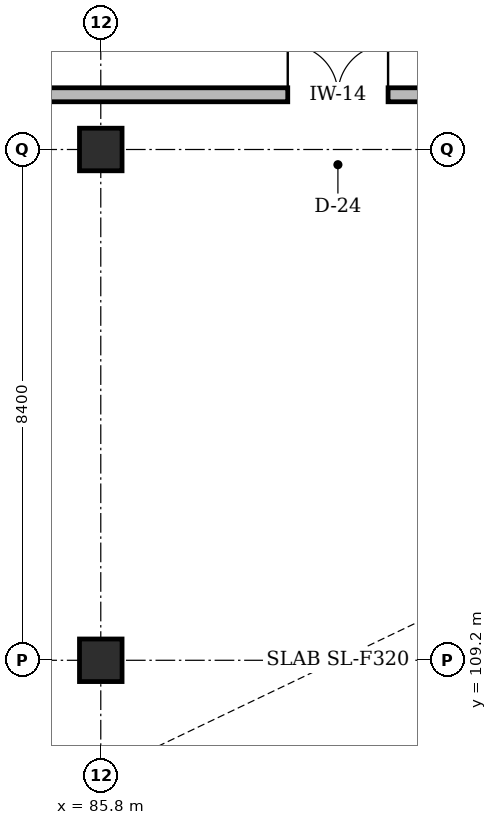
"""IFC4 building model, lengths in metres.
Left out: names, types, materials, properties, quantities, classifications, styles, units other than length and angle.
Written with IfcOpenShell. Run it as: python <this file> out.ifc"""

import sys

from ifc_helpers import new_model, si_unit, direction, frame, frame_2d, origin, origin_2d, place, context, subcontext, project, spatial, rectangle, extrude, element, fill, save


model = new_model("IFC4")
c1 = context("Model", 3, precision=1e-05, world=origin(), true_north=direction((0.0, 1.0)))
c2 = subcontext(c1, "Body", "Model", "MODEL_VIEW")
j1 = project(units=[si_unit("LENGTHUNIT", "METRE"), si_unit("PLANEANGLEUNIT", "RADIAN")], contexts=[c1])
p1 = place(None, origin())
s1 = spatial("IfcSite", under=j1, at=p1, CompositionType="ELEMENT")
p2 = place(p1, origin())
s2 = spatial("IfcBuilding", under=s1, at=p2, CompositionType="ELEMENT")
p3 = place(p2, frame((0.0, 0.0, 14.4)))
s3 = spatial("IfcBuildingStorey", under=s2, at=p3, CompositionType="ELEMENT", Elevation=14.4)
for number, where, z_axis, x_axis in (
    (1, (85.8, 109.2, 0.0), (0.0, 0.0, 1.0), (1.0, 0.0, 0.0)),
    (2, (85.8, 117.6, 0.0), (0.0, 0.0, 1.0), (1.0, 0.0, 0.0)),
):
    element("IfcColumn", number, at=place(p3, frame(where, z_axis=z_axis, x_axis=x_axis)), inside=s3, PredefinedType="COLUMN", context=c2, shape_type="SweptSolid", body=[
        extrude(rectangle(XDim=0.7, YDim=0.7, at=origin_2d()), origin(), (0.0, 0.0, 1.0), 3.6),
    ])
p4 = place(p3, frame((55.0, 118.5, 0.0), z_axis=(0.0, 0.0, 1.0), x_axis=(1.0, 0.0, 0.0)))
e3 = element("IfcWall", 3, at=p4, inside=s3, PredefinedType="STANDARD", context=c2, shape_type="SweptSolid", body=[
    extrude(rectangle(XDim=69.4, YDim=0.23, at=frame_2d((34.7, 0.0))), origin(), (0.0, 0.0, 1.0), 3.3),
])
p5 = place(p4, frame((33.875, 0.0, 0.0)))
e4 = element("IfcOpeningElement", 4, at=p5, cuts=e3, PredefinedType="OPENING", context=c2, shape_type="SweptSolid", body=[
    extrude(rectangle(XDim=1.65, YDim=2.25, at=frame_2d((0.825, 1.125))), frame((0.0, 0.125, 0.0), z_axis=(0.0, -1.0, 0.0), x_axis=(1.0, 0.0, 0.0)), (0.0, 0.0, 1.0), 0.25),
])
p6 = place(p5, origin())
e5 = element("IfcDoor", 5, at=p6, inside=s3, OperationType="DOUBLE_DOOR_SINGLE_SWING", PredefinedType="DOOR", context=c2, shape_type="SweptSolid", body=[
    extrude(rectangle(XDim=1.65, YDim=2.25, at=frame_2d((0.825, 1.125))), frame((0.0, 0.025, 0.0), z_axis=(0.0, -1.0, 0.0), x_axis=(1.0, 0.0, 0.0)), (0.0, 0.0, 1.0), 0.05),
])
fill(e4, e5)
save(model, sys.argv[1])
